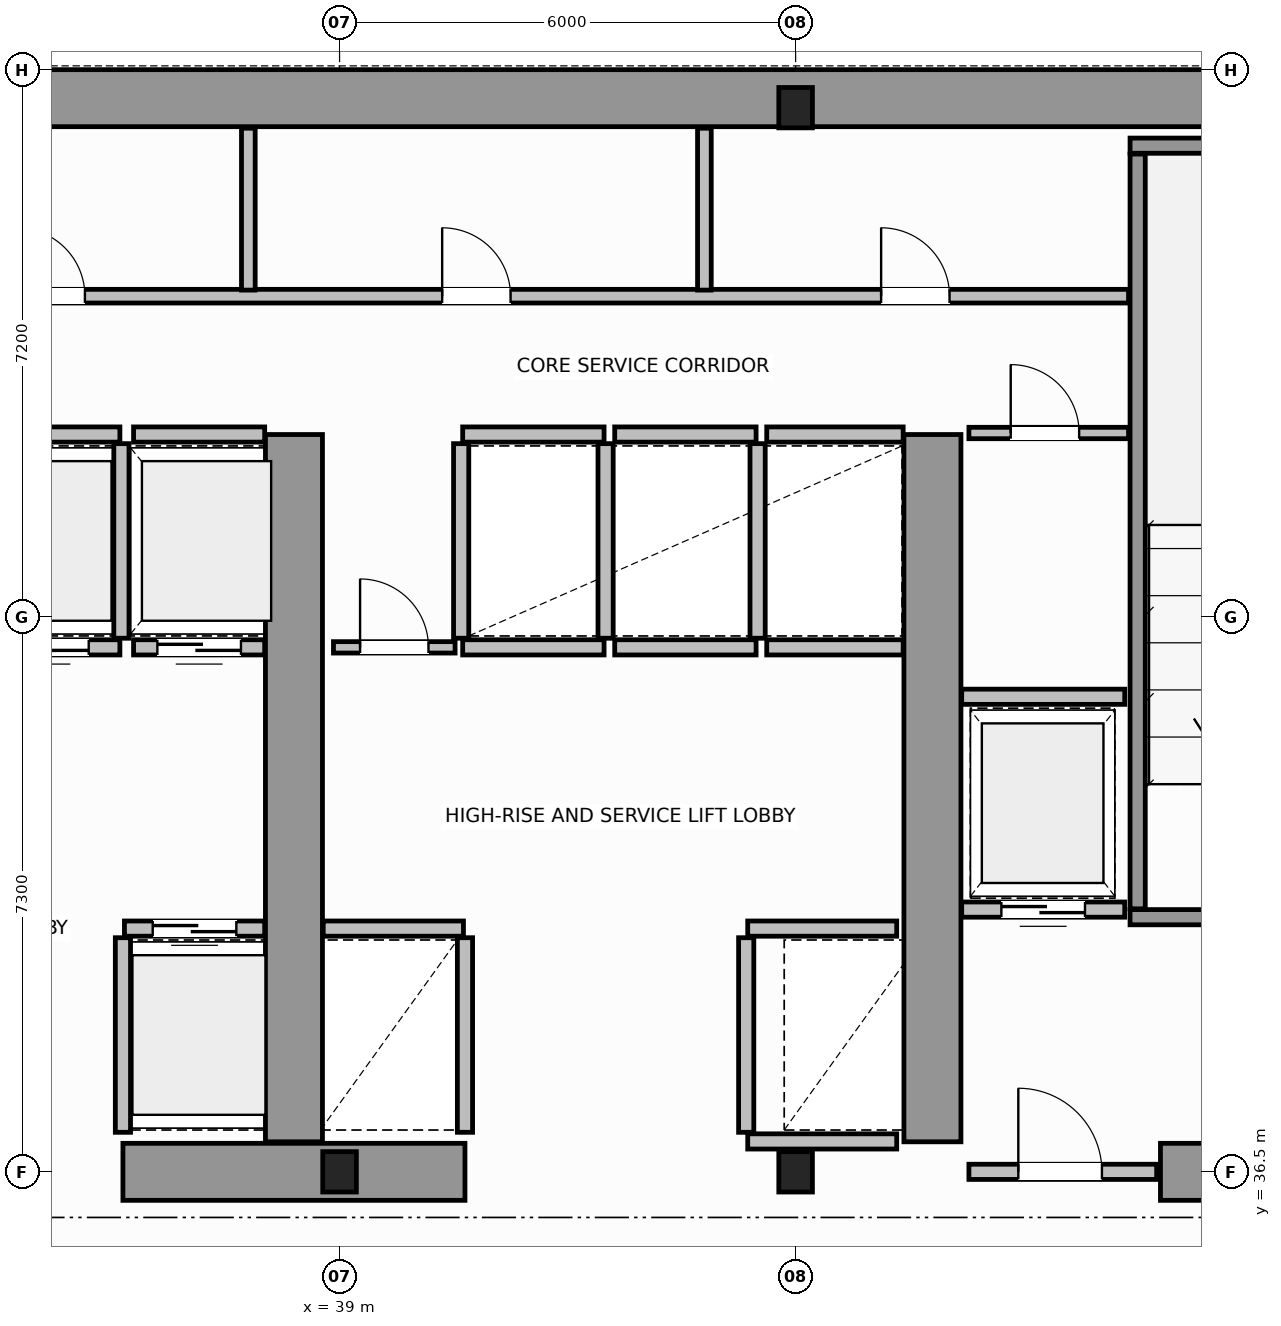
"""IFC4 building model, lengths in metres.
Left out: names, types, materials, properties, quantities, classifications, styles, units other than length and angle.
Written with IfcOpenShell. Run it as: python <this file> out.ifc"""

import sys

from ifc_helpers import new_model, si_unit, direction, frame, frame_2d, origin, origin_2d, place, context, subcontext, project, spatial, rectangle, i_section, extrude, source, transform, mapped, element, fill, save


model = new_model("IFC4")
c1 = context("Model", 3, precision=1e-05, world=origin(), true_north=direction((0.0, 1.0)))
c2 = subcontext(c1, "Body", "Model", "MODEL_VIEW")
j1 = project(units=[si_unit("LENGTHUNIT", "METRE"), si_unit("PLANEANGLEUNIT", "RADIAN")], contexts=[c1])
p1 = place(None, origin())
s1 = spatial("IfcSite", under=j1, at=p1, CompositionType="ELEMENT")
p2 = place(p1, origin())
s2 = spatial("IfcBuilding", under=s1, at=p2, CompositionType="ELEMENT")
p3 = place(p2, frame((0.0, 0.0, 126.2)))
s3 = spatial("IfcBuildingStorey", under=s2, at=p3, CompositionType="ELEMENT", Elevation=126.2)
m1 = source(origin(), c2, "Body", "SweptSolid", [
    extrude(i_section(OverallWidth=0.442, OverallDepth=0.531, WebThickness=0.065, FlangeThickness=0.076, FilletRadius=0.015, at=origin_2d()), origin(), (0.0, 0.0, 1.0), 3.8),
])
for number, where, z_axis, x_axis in (
    (1, (39.0, 36.5, 0.0), (0.0, 0.0, 1.0), (1.0, 0.0, 0.0)),
    (2, (45.0, 36.5, 0.0), (0.0, 0.0, 1.0), (1.0, 0.0, 0.0)),
    (3, (45.0, 50.5, 0.0), (0.0, 0.0, 1.0), (1.0, 0.0, 0.0)),
):
    element("IfcColumn", number, at=place(p3, frame(where, z_axis=z_axis, x_axis=x_axis)), inside=s3, PredefinedType="COLUMN", context=c2, shape_type="MappedRepresentation", body=[
        mapped(m1, transform((0.0, 0.0, 0.0), scale=1.0)),
    ])
p4 = place(p3, frame((34.002, 50.625, 0.0), z_axis=(0.0, 0.0, 1.0), x_axis=(1.0, 0.0, 0.0)))
e4 = element("IfcWall", 4, at=p4, inside=s3, PredefinedType="SHEAR", context=c2, shape_type="SweptSolid", body=[
    extrude(rectangle(XDim=19.619, YDim=0.75, at=frame_2d((9.81, 0.0))), origin(), (0.0, 0.0, 1.0), 3.8),
])
p5 = place(p3, frame((36.15, 36.5, 0.0), z_axis=(0.0, 0.0, 1.0), x_axis=(1.0, 0.0, 0.0)))
e5 = element("IfcWall", 5, at=p5, inside=s3, PredefinedType="SHEAR", context=c2, shape_type="SweptSolid", body=[
    extrude(rectangle(XDim=4.5, YDim=0.75, at=frame_2d((2.25, 0.0))), origin(), (0.0, 0.0, 1.0), 3.8),
])
p6 = place(p3, frame((49.8, 36.5, 0.0), z_axis=(0.0, 0.0, 1.0), x_axis=(1.0, 0.0, 0.0)))
e6 = element("IfcWall", 6, at=p6, inside=s3, PredefinedType="SHEAR", context=c2, shape_type="SweptSolid", body=[
    extrude(rectangle(XDim=3.805, YDim=0.75, at=frame_2d((1.902, 0.0))), origin(), (0.0, 0.0, 1.0), 2.38),
])
for number, where, z_axis, x_axis in (
    (7, (38.4, 36.895, 0.0), (0.0, 0.0, 1.0), (0.0, 1.0, 0.0)),
    (8, (46.8, 36.895, 0.0), (0.0, 0.0, 1.0), (0.0, 1.0, 0.0)),
):
    element("IfcWall", number, at=place(p3, frame(where, z_axis=z_axis, x_axis=x_axis)), inside=s3, PredefinedType="SHEAR", context=c2, shape_type="SweptSolid", body=[
        extrude(rectangle(XDim=9.305, YDim=0.75, at=frame_2d((4.652, 0.0))), origin(), (0.0, 0.0, 1.0), 3.8),
    ])
p7 = place(p3, frame((49.4, 39.85, 0.0), z_axis=(0.0, 0.0, 1.0), x_axis=(1.0, 0.0, 0.0)))
e9 = element("IfcWall", 9, at=p7, inside=s3, PredefinedType="SOLIDWALL", context=c2, shape_type="SweptSolid", body=[
    extrude(rectangle(XDim=4.225, YDim=0.2, at=frame_2d((2.113, 0.0))), origin(), (0.0, 0.0, 1.0), 3.8),
])
p8 = place(p7, frame((1.325, 0.0, 0.0)))
e10 = element("IfcOpeningElement", 10, at=p8, cuts=e9, PredefinedType="OPENING", context=c2, shape_type="SweptSolid", body=[
    extrude(rectangle(XDim=1.1, YDim=2.15, at=frame_2d((0.55, 1.075))), frame((0.0, 0.11, 0.0), z_axis=(0.0, -1.0, 0.0), x_axis=(1.0, 0.0, 0.0)), (0.0, 0.0, 1.0), 0.22),
])
p9 = place(p3, frame((49.4, 50.0, 0.0), z_axis=(0.0, 0.0, 1.0), x_axis=(1.0, 0.0, 0.0)))
e11 = element("IfcWall", 11, at=p9, inside=s3, PredefinedType="SOLIDWALL", context=c2, shape_type="SweptSolid", body=[
    extrude(rectangle(XDim=4.225, YDim=0.2, at=frame_2d((2.113, 0.0))), origin(), (0.0, 0.0, 1.0), 3.8),
])
p10 = place(p3, frame((49.5, 39.96, 0.0), z_axis=(0.0, 0.0, 1.0), x_axis=(0.0, 1.0, 0.0)))
e12 = element("IfcWall", 12, at=p10, inside=s3, PredefinedType="SOLIDWALL", context=c2, shape_type="SweptSolid", body=[
    extrude(rectangle(XDim=9.93, YDim=0.2, at=frame_2d((4.965, 0.0))), origin(), (0.0, 0.0, 1.0), 3.8),
])
p11 = place(p3, frame((47.28, 36.5, 0.0), z_axis=(0.0, 0.0, 1.0), x_axis=(1.0, 0.0, 0.0)))
e13 = element("IfcWall", 13, at=p11, inside=s3, PredefinedType="SOLIDWALL", context=c2, shape_type="SweptSolid", body=[
    extrude(rectangle(XDim=2.47, YDim=0.2, at=frame_2d((1.235, 0.0))), origin(), (0.0, 0.0, 1.0), 2.37),
])
p12 = place(p11, frame((0.65, 0.0, 0.0)))
e14 = element("IfcOpeningElement", 14, at=p12, cuts=e13, PredefinedType="OPENING", context=c2, shape_type="SweptSolid", body=[
    extrude(rectangle(XDim=1.1, YDim=2.15, at=frame_2d((0.55, 1.075))), frame((0.0, 0.11, 0.0), z_axis=(0.0, -1.0, 0.0), x_axis=(1.0, 0.0, 0.0)), (0.0, 0.0, 1.0), 0.22),
])
p13 = place(p3, frame((36.17, 39.7, 0.0), z_axis=(0.0, 0.0, 1.0), x_axis=(1.0, 0.0, 0.0)))
e15 = element("IfcWall", 15, at=p13, inside=s3, PredefinedType="SOLIDWALL", context=c2, shape_type="SweptSolid", body=[
    extrude(rectangle(XDim=1.845, YDim=0.2, at=frame_2d((0.922, 0.0))), origin(), (0.0, 0.0, 1.0), 3.58),
])
p14 = place(p13, frame((0.372, 0.0, 0.0)))
e16 = element("IfcOpeningElement", 16, at=p14, cuts=e15, PredefinedType="OPENING", context=c2, shape_type="SweptSolid", body=[
    extrude(rectangle(XDim=1.1, YDim=2.15, at=frame_2d((0.55, 1.075))), frame((0.0, 0.11, 0.0), z_axis=(0.0, -1.0, 0.0), x_axis=(1.0, 0.0, 0.0)), (0.0, 0.0, 1.0), 0.22),
])
p15 = place(p3, frame((36.15, 37.02, 0.0), z_axis=(0.0, 0.0, 1.0), x_axis=(0.0, 1.0, 0.0)))
e17 = element("IfcWall", 17, at=p15, inside=s3, PredefinedType="SOLIDWALL", context=c2, shape_type="SweptSolid", body=[
    extrude(rectangle(XDim=2.56, YDim=0.2, at=frame_2d((1.28, 0.0))), origin(), (0.0, 0.0, 1.0), 3.58),
])
p16 = place(p3, frame((34.19, 43.4, 0.0), z_axis=(0.0, 0.0, 1.0), x_axis=(1.0, 0.0, 0.0)))
e18 = element("IfcWall", 18, at=p16, inside=s3, PredefinedType="SOLIDWALL", context=c2, shape_type="SweptSolid", body=[
    extrude(rectangle(XDim=1.92, YDim=0.2, at=frame_2d((0.96, 0.0))), origin(), (0.0, 0.0, 1.0), 3.58),
])
p17 = place(p16, frame((0.41, 0.0, 0.0)))
e19 = element("IfcOpeningElement", 19, at=p17, cuts=e18, PredefinedType="OPENING", context=c2, shape_type="SweptSolid", body=[
    extrude(rectangle(XDim=1.1, YDim=2.15, at=frame_2d((0.55, 1.075))), frame((0.0, 0.11, 0.0), z_axis=(0.0, -1.0, 0.0), x_axis=(1.0, 0.0, 0.0)), (0.0, 0.0, 1.0), 0.22),
])
p18 = place(p3, frame((34.19, 46.2, 0.0), z_axis=(0.0, 0.0, 1.0), x_axis=(1.0, 0.0, 0.0)))
e20 = element("IfcWall", 20, at=p18, inside=s3, PredefinedType="SOLIDWALL", context=c2, shape_type="SweptSolid", body=[
    extrude(rectangle(XDim=1.92, YDim=0.2, at=frame_2d((0.96, 0.0))), origin(), (0.0, 0.0, 1.0), 3.58),
])
p19 = place(p3, frame((36.13, 43.52, 0.0), z_axis=(0.0, 0.0, 1.0), x_axis=(0.0, 1.0, 0.0)))
e21 = element("IfcWall", 21, at=p19, inside=s3, PredefinedType="SOLIDWALL", context=c2, shape_type="SweptSolid", body=[
    extrude(rectangle(XDim=2.56, YDim=0.2, at=frame_2d((1.28, 0.0))), origin(), (0.0, 0.0, 1.0), 3.58),
])
p20 = place(p3, frame((36.29, 43.4, 0.0), z_axis=(0.0, 0.0, 1.0), x_axis=(1.0, 0.0, 0.0)))
e22 = element("IfcWall", 22, at=p20, inside=s3, PredefinedType="SOLIDWALL", context=c2, shape_type="SweptSolid", body=[
    extrude(rectangle(XDim=1.725, YDim=0.2, at=frame_2d((0.862, 0.0))), origin(), (0.0, 0.0, 1.0), 3.58),
])
p21 = place(p20, frame((0.313, 0.0, 0.0)))
e23 = element("IfcOpeningElement", 23, at=p21, cuts=e22, PredefinedType="OPENING", context=c2, shape_type="SweptSolid", body=[
    extrude(rectangle(XDim=1.1, YDim=2.15, at=frame_2d((0.55, 1.075))), frame((0.0, 0.11, 0.0), z_axis=(0.0, -1.0, 0.0), x_axis=(1.0, 0.0, 0.0)), (0.0, 0.0, 1.0), 0.22),
])
p22 = place(p3, frame((36.29, 46.2, 0.0), z_axis=(0.0, 0.0, 1.0), x_axis=(1.0, 0.0, 0.0)))
e24 = element("IfcWall", 24, at=p22, inside=s3, PredefinedType="SOLIDWALL", context=c2, shape_type="SweptSolid", body=[
    extrude(rectangle(XDim=1.725, YDim=0.2, at=frame_2d((0.862, 0.0))), origin(), (0.0, 0.0, 1.0), 3.58),
])
p23 = place(p3, frame((38.785, 39.7, 0.0), z_axis=(0.0, 0.0, 1.0), x_axis=(1.0, 0.0, 0.0)))
e25 = element("IfcWall", 25, at=p23, inside=s3, PredefinedType="SOLIDWALL", context=c2, shape_type="SweptSolid", body=[
    extrude(rectangle(XDim=1.845, YDim=0.2, at=frame_2d((0.922, 0.0))), origin(), (0.0, 0.0, 1.0), 3.58),
])
p24 = place(p3, frame((40.65, 37.02, 0.0), z_axis=(0.0, 0.0, 1.0), x_axis=(0.0, 1.0, 0.0)))
e26 = element("IfcWall", 26, at=p24, inside=s3, PredefinedType="SOLIDWALL", context=c2, shape_type="SweptSolid", body=[
    extrude(rectangle(XDim=2.56, YDim=0.2, at=frame_2d((1.28, 0.0))), origin(), (0.0, 0.0, 1.0), 3.58),
])
p25 = place(p3, frame((44.37, 39.7, 0.0), z_axis=(0.0, 0.0, 1.0), x_axis=(1.0, 0.0, 0.0)))
e27 = element("IfcWall", 27, at=p25, inside=s3, PredefinedType="SOLIDWALL", context=c2, shape_type="SweptSolid", body=[
    extrude(rectangle(XDim=1.96, YDim=0.2, at=frame_2d((0.98, 0.0))), origin(), (0.0, 0.0, 1.0), 3.58),
])
p26 = place(p3, frame((44.37, 36.9, 0.0), z_axis=(0.0, 0.0, 1.0), x_axis=(1.0, 0.0, 0.0)))
e28 = element("IfcWall", 28, at=p26, inside=s3, PredefinedType="SOLIDWALL", context=c2, shape_type="SweptSolid", body=[
    extrude(rectangle(XDim=1.96, YDim=0.2, at=frame_2d((0.98, 0.0))), origin(), (0.0, 0.0, 1.0), 2.37),
])
p27 = place(p3, frame((44.35, 37.02, 0.0), z_axis=(0.0, 0.0, 1.0), x_axis=(0.0, 1.0, 0.0)))
e29 = element("IfcWall", 29, at=p27, inside=s3, PredefinedType="SOLIDWALL", context=c2, shape_type="SweptSolid", body=[
    extrude(rectangle(XDim=2.56, YDim=0.2, at=frame_2d((1.28, 0.0))), origin(), (0.0, 0.0, 1.0), 3.58),
])
for number, where, z_axis, x_axis in (
    (30, (40.62, 43.4, 0.0), (0.0, 0.0, 1.0), (1.0, 0.0, 0.0)),
    (31, (40.62, 46.2, 0.0), (0.0, 0.0, 1.0), (1.0, 0.0, 0.0)),
):
    element("IfcWall", number, at=place(p3, frame(where, z_axis=z_axis, x_axis=x_axis)), inside=s3, PredefinedType="SOLIDWALL", context=c2, shape_type="SweptSolid", body=[
        extrude(rectangle(XDim=1.86, YDim=0.2, at=frame_2d((0.93, 0.0))), origin(), (0.0, 0.0, 1.0), 3.58),
    ])
for number, where, z_axis, x_axis in (
    (32, (40.6, 43.52, 0.0), (0.0, 0.0, 1.0), (0.0, 1.0, 0.0)),
    (33, (42.5, 43.52, 0.0), (0.0, 0.0, 1.0), (0.0, 1.0, 0.0)),
):
    element("IfcWall", number, at=place(p3, frame(where, z_axis=z_axis, x_axis=x_axis)), inside=s3, PredefinedType="SOLIDWALL", context=c2, shape_type="SweptSolid", body=[
        extrude(rectangle(XDim=2.56, YDim=0.2, at=frame_2d((1.28, 0.0))), origin(), (0.0, 0.0, 1.0), 3.58),
    ])
for number, where, z_axis, x_axis in (
    (34, (42.62, 43.4, 0.0), (0.0, 0.0, 1.0), (1.0, 0.0, 0.0)),
    (35, (42.62, 46.2, 0.0), (0.0, 0.0, 1.0), (1.0, 0.0, 0.0)),
):
    element("IfcWall", number, at=place(p3, frame(where, z_axis=z_axis, x_axis=x_axis)), inside=s3, PredefinedType="SOLIDWALL", context=c2, shape_type="SweptSolid", body=[
        extrude(rectangle(XDim=1.86, YDim=0.2, at=frame_2d((0.93, 0.0))), origin(), (0.0, 0.0, 1.0), 3.58),
    ])
p28 = place(p3, frame((44.5, 43.52, 0.0), z_axis=(0.0, 0.0, 1.0), x_axis=(0.0, 1.0, 0.0)))
e36 = element("IfcWall", 36, at=p28, inside=s3, PredefinedType="SOLIDWALL", context=c2, shape_type="SweptSolid", body=[
    extrude(rectangle(XDim=2.56, YDim=0.2, at=frame_2d((1.28, 0.0))), origin(), (0.0, 0.0, 1.0), 3.58),
])
for number, where, z_axis, x_axis in (
    (37, (44.62, 43.4, 0.0), (0.0, 0.0, 1.0), (1.0, 0.0, 0.0)),
    (38, (44.62, 46.2, 0.0), (0.0, 0.0, 1.0), (1.0, 0.0, 0.0)),
):
    element("IfcWall", number, at=place(p3, frame(where, z_axis=z_axis, x_axis=x_axis)), inside=s3, PredefinedType="SOLIDWALL", context=c2, shape_type="SweptSolid", body=[
        extrude(rectangle(XDim=1.795, YDim=0.2, at=frame_2d((0.897, 0.0))), origin(), (0.0, 0.0, 1.0), 3.58),
    ])
p29 = place(p3, frame((47.185, 39.95, 0.0), z_axis=(0.0, 0.0, 1.0), x_axis=(1.0, 0.0, 0.0)))
e39 = element("IfcWall", 39, at=p29, inside=s3, PredefinedType="SOLIDWALL", context=c2, shape_type="SweptSolid", body=[
    extrude(rectangle(XDim=2.145, YDim=0.2, at=frame_2d((1.073, 0.0))), origin(), (0.0, 0.0, 1.0), 3.58),
])
p30 = place(p29, frame((0.522, 0.0, 0.0)))
e40 = element("IfcOpeningElement", 40, at=p30, cuts=e39, PredefinedType="OPENING", context=c2, shape_type="SweptSolid", body=[
    extrude(rectangle(XDim=1.1, YDim=2.15, at=frame_2d((0.55, 1.075))), frame((0.0, 0.11, 0.0), z_axis=(0.0, -1.0, 0.0), x_axis=(1.0, 0.0, 0.0)), (0.0, 0.0, 1.0), 0.22),
])
p31 = place(p3, frame((47.185, 42.75, 0.0), z_axis=(0.0, 0.0, 1.0), x_axis=(1.0, 0.0, 0.0)))
e41 = element("IfcWall", 41, at=p31, inside=s3, PredefinedType="SOLIDWALL", context=c2, shape_type="SweptSolid", body=[
    extrude(rectangle(XDim=2.145, YDim=0.2, at=frame_2d((1.073, 0.0))), origin(), (0.0, 0.0, 1.0), 3.58),
])
p32 = place(p3, frame((47.28, 46.22, 0.0), z_axis=(0.0, 0.0, 1.0), x_axis=(1.0, 0.0, 0.0)))
e42 = element("IfcWall", 42, at=p32, inside=s3, PredefinedType="PARTITIONING", context=c2, shape_type="SweptSolid", body=[
    extrude(rectangle(XDim=2.1, YDim=0.15, at=frame_2d((1.05, 0.0))), origin(), (0.0, 0.0, 1.0), 3.58),
])
p33 = place(p32, frame((0.55, 0.0, 0.0)))
e43 = element("IfcOpeningElement", 43, at=p33, cuts=e42, PredefinedType="OPENING", context=c2, shape_type="SweptSolid", body=[
    extrude(rectangle(XDim=0.9, YDim=2.1, at=frame_2d((0.45, 1.05))), frame((0.0, 0.085, 0.0), z_axis=(0.0, -1.0, 0.0), x_axis=(1.0, 0.0, 0.0)), (0.0, 0.0, 1.0), 0.17),
])
p34 = place(p3, frame((38.92, 43.4, 0.0), z_axis=(0.0, 0.0, 1.0), x_axis=(1.0, 0.0, 0.0)))
e44 = element("IfcWall", 44, at=p34, inside=s3, PredefinedType="PARTITIONING", context=c2, shape_type="SweptSolid", body=[
    extrude(rectangle(XDim=1.6, YDim=0.15, at=frame_2d((0.8, 0.0))), origin(), (0.0, 0.0, 1.0), 3.58),
])
p35 = place(p34, frame((0.35, 0.0, 0.0)))
e45 = element("IfcOpeningElement", 45, at=p35, cuts=e44, PredefinedType="OPENING", context=c2, shape_type="SweptSolid", body=[
    extrude(rectangle(XDim=0.9, YDim=2.1, at=frame_2d((0.45, 1.05))), frame((0.0, 0.085, 0.0), z_axis=(0.0, -1.0, 0.0), x_axis=(1.0, 0.0, 0.0)), (0.0, 0.0, 1.0), 0.17),
])
p36 = place(p3, frame((18.62, 48.02, 0.0), z_axis=(0.0, 0.0, 1.0), x_axis=(1.0, 0.0, 0.0)))
e46 = element("IfcWall", 46, at=p36, inside=s3, PredefinedType="PLUMBINGWALL", context=c2, shape_type="SweptSolid", body=[
    extrude(rectangle(XDim=30.76, YDim=0.18, at=frame_2d((15.38, 0.0))), origin(), (0.0, 0.0, 1.0), 3.58),
])
p37 = place(p36, frame((1.655, 0.0, 0.0)))
e47 = element("IfcOpeningElement", 47, at=p37, cuts=e46, PredefinedType="OPENING", context=c2, shape_type="SweptSolid", body=[
    extrude(rectangle(XDim=0.9, YDim=2.15, at=frame_2d((0.45, 1.075))), frame((0.0, 0.1, 0.0), z_axis=(0.0, -1.0, 0.0), x_axis=(1.0, 0.0, 0.0)), (0.0, 0.0, 1.0), 0.2),
])
p38 = place(p36, frame((6.03, 0.0, 0.0)))
e48 = element("IfcOpeningElement", 48, at=p38, cuts=e46, PredefinedType="OPENING", context=c2, shape_type="SweptSolid", body=[
    extrude(rectangle(XDim=0.9, YDim=2.15, at=frame_2d((0.45, 1.075))), frame((0.0, 0.1, 0.0), z_axis=(0.0, -1.0, 0.0), x_axis=(1.0, 0.0, 0.0)), (0.0, 0.0, 1.0), 0.2),
])
p39 = place(p36, frame((10.93, 0.0, 0.0)))
e49 = element("IfcOpeningElement", 49, at=p39, cuts=e46, PredefinedType="OPENING", context=c2, shape_type="SweptSolid", body=[
    extrude(rectangle(XDim=0.9, YDim=2.15, at=frame_2d((0.45, 1.075))), frame((0.0, 0.1, 0.0), z_axis=(0.0, -1.0, 0.0), x_axis=(1.0, 0.0, 0.0)), (0.0, 0.0, 1.0), 0.2),
])
p40 = place(p36, frame((16.13, 0.0, 0.0)))
e50 = element("IfcOpeningElement", 50, at=p40, cuts=e46, PredefinedType="OPENING", context=c2, shape_type="SweptSolid", body=[
    extrude(rectangle(XDim=0.9, YDim=2.15, at=frame_2d((0.45, 1.075))), frame((0.0, 0.1, 0.0), z_axis=(0.0, -1.0, 0.0), x_axis=(1.0, 0.0, 0.0)), (0.0, 0.0, 1.0), 0.2),
])
p41 = place(p36, frame((21.73, 0.0, 0.0)))
e51 = element("IfcOpeningElement", 51, at=p41, cuts=e46, PredefinedType="OPENING", context=c2, shape_type="SweptSolid", body=[
    extrude(rectangle(XDim=0.9, YDim=2.15, at=frame_2d((0.45, 1.075))), frame((0.0, 0.1, 0.0), z_axis=(0.0, -1.0, 0.0), x_axis=(1.0, 0.0, 0.0)), (0.0, 0.0, 1.0), 0.2),
])
p42 = place(p36, frame((27.505, 0.0, 0.0)))
e52 = element("IfcOpeningElement", 52, at=p42, cuts=e46, PredefinedType="OPENING", context=c2, shape_type="SweptSolid", body=[
    extrude(rectangle(XDim=0.9, YDim=2.15, at=frame_2d((0.45, 1.075))), frame((0.0, 0.1, 0.0), z_axis=(0.0, -1.0, 0.0), x_axis=(1.0, 0.0, 0.0)), (0.0, 0.0, 1.0), 0.2),
])
for number, where, z_axis, x_axis in (
    (53, (37.8, 48.1, 0.0), (0.0, 0.0, 1.0), (0.0, 1.0, 0.0)),
    (54, (43.8, 48.1, 0.0), (0.0, 0.0, 1.0), (0.0, 1.0, 0.0)),
):
    element("IfcWall", number, at=place(p3, frame(where, z_axis=z_axis, x_axis=x_axis)), inside=s3, PredefinedType="PLUMBINGWALL", context=c2, shape_type="SweptSolid", body=[
        extrude(rectangle(XDim=2.13, YDim=0.18, at=frame_2d((1.065, 0.0))), origin(), (0.0, 0.0, 1.0), 3.58),
    ])
m2 = source(origin(), c2, "Body", "SweptSolid", [
    extrude(rectangle(XDim=1.1, YDim=2.15, at=frame_2d((0.55, 1.075))), frame((0.0, 0.025, 0.0), z_axis=(0.0, -1.0, 0.0), x_axis=(1.0, 0.0, 0.0)), (0.0, 0.0, 1.0), 0.05),
])
p43 = place(p12, origin())
e55 = element("IfcDoor", 55, at=p43, inside=s3, OperationType="SINGLE_SWING_LEFT", PredefinedType="DOOR", context=c2, shape_type="MappedRepresentation", body=[
    mapped(m2, transform((0.0, 0.0, 0.0), scale=1.0)),
])
fill(e14, e55)
p44 = place(p14, origin())
e56 = element("IfcDoor", 56, at=p44, inside=s3, OperationType="DOUBLE_DOOR_SLIDING", PredefinedType="DOOR", context=c2, shape_type="MappedRepresentation", body=[
    mapped(m2, transform((0.0, 0.0, 0.0), scale=1.0)),
])
fill(e16, e56)
p45 = place(p17, origin())
e57 = element("IfcDoor", 57, at=p45, inside=s3, OperationType="DOUBLE_DOOR_SLIDING", PredefinedType="DOOR", context=c2, shape_type="MappedRepresentation", body=[
    mapped(m2, transform((0.0, 0.0, 0.0), scale=1.0)),
])
fill(e19, e57)
p46 = place(p21, origin())
e58 = element("IfcDoor", 58, at=p46, inside=s3, OperationType="DOUBLE_DOOR_SLIDING", PredefinedType="DOOR", context=c2, shape_type="MappedRepresentation", body=[
    mapped(m2, transform((0.0, 0.0, 0.0), scale=1.0)),
])
fill(e23, e58)
p47 = place(p30, origin())
e59 = element("IfcDoor", 59, at=p47, inside=s3, OperationType="DOUBLE_DOOR_SLIDING", PredefinedType="DOOR", context=c2, shape_type="MappedRepresentation", body=[
    mapped(m2, transform((0.0, 0.0, 0.0), scale=1.0)),
])
fill(e40, e59)
m3 = source(origin(), c2, "Body", "SweptSolid", [
    extrude(rectangle(XDim=0.9, YDim=2.1, at=frame_2d((0.45, 1.05))), frame((0.0, 0.025, 0.0), z_axis=(0.0, -1.0, 0.0), x_axis=(1.0, 0.0, 0.0)), (0.0, 0.0, 1.0), 0.05),
])
p48 = place(p33, origin())
e60 = element("IfcDoor", 60, at=p48, inside=s3, OperationType="SINGLE_SWING_RIGHT", PredefinedType="DOOR", context=c2, shape_type="MappedRepresentation", body=[
    mapped(m3, transform((0.0, 0.0, 0.0), scale=1.0)),
])
fill(e43, e60)
p49 = place(p35, origin())
e61 = element("IfcDoor", 61, at=p49, inside=s3, OperationType="SINGLE_SWING_LEFT", PredefinedType="DOOR", context=c2, shape_type="MappedRepresentation", body=[
    mapped(m3, transform((0.0, 0.0, 0.0), scale=1.0)),
])
fill(e45, e61)
m4 = source(origin(), c2, "Body", "SweptSolid", [
    extrude(rectangle(XDim=0.9, YDim=2.15, at=frame_2d((0.45, 1.075))), frame((0.0, 0.025, 0.0), z_axis=(0.0, -1.0, 0.0), x_axis=(1.0, 0.0, 0.0)), (0.0, 0.0, 1.0), 0.05),
])
p50 = place(p40, origin())
e62 = element("IfcDoor", 62, at=p50, inside=s3, OperationType="SINGLE_SWING_RIGHT", PredefinedType="DOOR", context=c2, shape_type="MappedRepresentation", body=[
    mapped(m4, transform((0.0, 0.0, 0.0), scale=1.0)),
])
fill(e50, e62)
p51 = place(p41, origin())
e63 = element("IfcDoor", 63, at=p51, inside=s3, OperationType="SINGLE_SWING_LEFT", PredefinedType="DOOR", context=c2, shape_type="MappedRepresentation", body=[
    mapped(m4, transform((0.0, 0.0, 0.0), scale=1.0)),
])
fill(e51, e63)
p52 = place(p42, origin())
e64 = element("IfcDoor", 64, at=p52, inside=s3, OperationType="SINGLE_SWING_RIGHT", PredefinedType="DOOR", context=c2, shape_type="MappedRepresentation", body=[
    mapped(m4, transform((0.0, 0.0, 0.0), scale=1.0)),
])
fill(e52, e64)
save(model, sys.argv[1])
